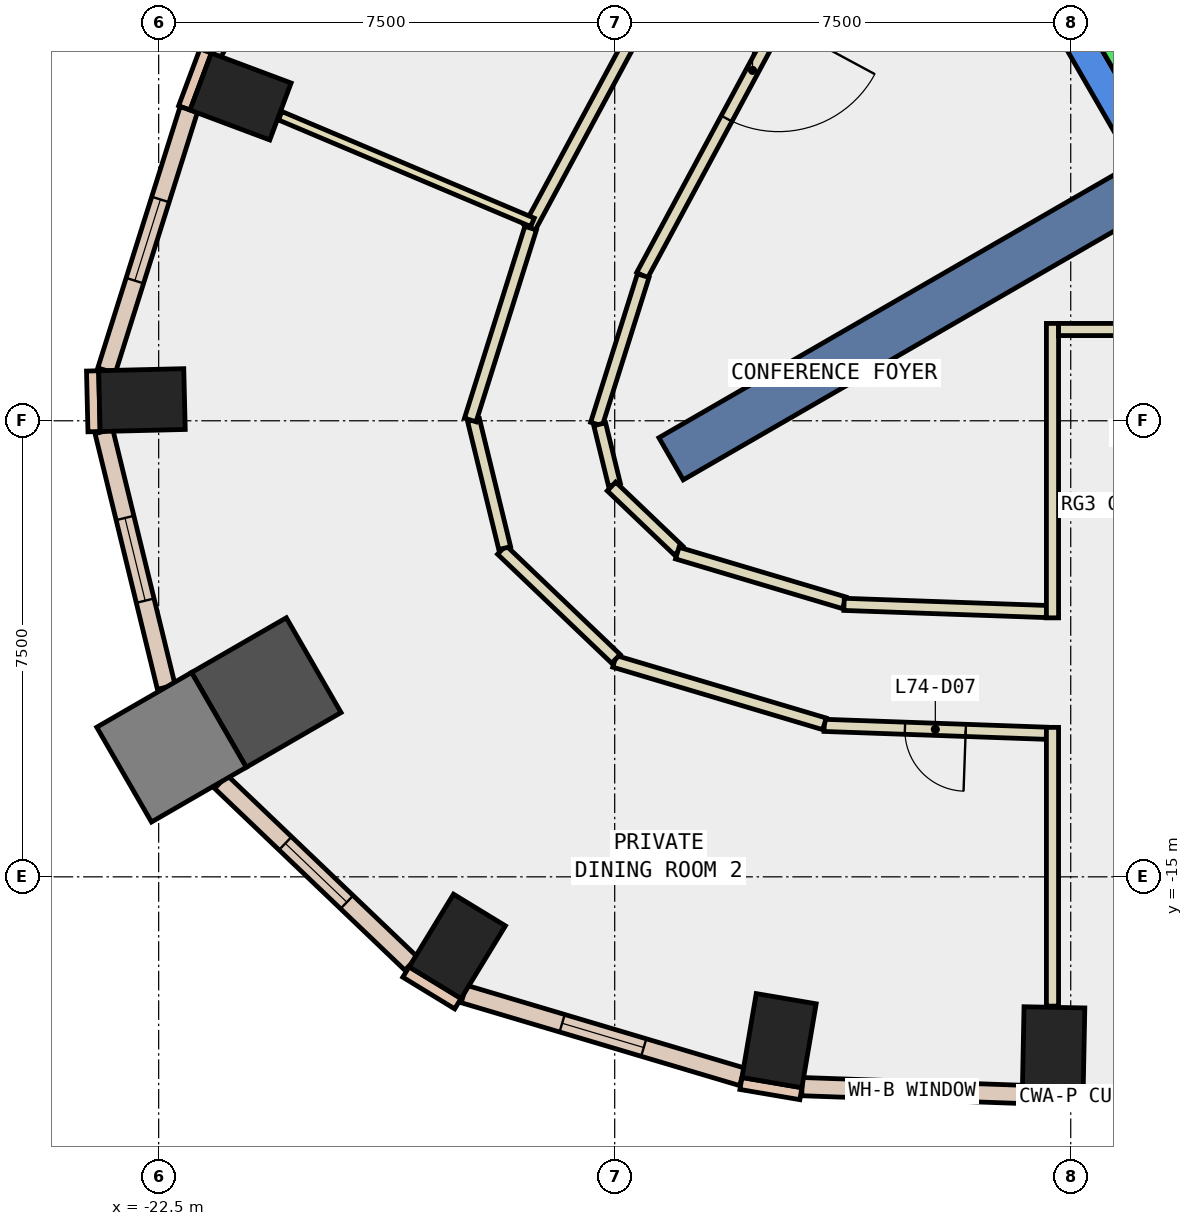
"""IFC4 building model, lengths in metres.
Left out: names, types, materials, properties, quantities, classifications, styles, units other than length and angle.
Written with IfcOpenShell. Run it as: python <this file> out.ifc"""

import sys

from ifc_helpers import new_model, si_unit, direction, frame, frame_2d, origin, origin_2d, place, context, subcontext, project, spatial, polyline, rectangle, outline, extrude, element, fill, save


model = new_model("IFC4")
c1 = context("Model", 3, precision=1e-05, world=origin(), true_north=direction((0.0, 1.0)))
c2 = subcontext(c1, "Body", "Model", "MODEL_VIEW")
j1 = project(units=[si_unit("LENGTHUNIT", "METRE"), si_unit("PLANEANGLEUNIT", "RADIAN")], contexts=[c1])
p1 = place(None, origin())
s1 = spatial("IfcSite", under=j1, at=p1, CompositionType="ELEMENT")
p2 = place(p1, origin())
s2 = spatial("IfcBuilding", under=s1, at=p2, CompositionType="ELEMENT")
p3 = place(p2, frame((0.0, 0.0, 315.2)))
s3 = spatial("IfcBuildingStorey", under=s2, at=p3, CompositionType="ELEMENT", Elevation=315.2)
for number, where, z_axis, x_axis in (
    (1, (-12.297, -17.694, -0.34), (0.0, 0.0, 1.0), (-0.986, 0.168, 0.0)),
    (2, (-7.782, -17.846, -0.34), (0.0, 0.0, 1.0), (-1.0, 0.02, 0.0)),
    (3, (-21.153, -2.168, -0.34), (0.0, 0.0, 1.0), (0.351, 0.936, 0.0)),
    (4, (-22.775, -7.16, -0.34), (0.0, 0.0, 1.0), (-0.024, 1.0, 0.0)),
):
    element("IfcColumn", number, at=place(p3, frame(where, z_axis=z_axis, x_axis=x_axis)), inside=s3, PredefinedType="COLUMN", context=c2, shape_type="SweptSolid", body=[
        extrude(rectangle(XDim=1.0, YDim=1.4, at=origin_2d()), origin(), (0.0, 0.0, 1.0), 3.6),
    ])
p4 = place(p3, frame((-20.73, -11.969, -0.34), z_axis=(0.0, 0.0, 1.0), x_axis=(0.866025403784, 0.5, 0.0)))
e5 = element("IfcColumn", 5, at=p4, inside=s3, PredefinedType="COLUMN", context=c2, shape_type="SweptSolid", body=[
    extrude(rectangle(XDim=1.8, YDim=1.8, at=origin_2d()), origin(), (0.0, 0.0, 1.0), 3.6),
])
p5 = place(p3, frame((-17.589, -16.143, -0.34), z_axis=(0.0, 0.0, 1.0), x_axis=(-0.853650808213, 0.520845752251, 0.0)))
e6 = element("IfcColumn", 6, at=p5, inside=s3, PredefinedType="COLUMN", context=c2, shape_type="SweptSolid", body=[
    extrude(rectangle(XDim=1.0, YDim=1.4, at=origin_2d()), origin(), (0.0, 0.0, 1.0), 3.6),
])
p6 = place(p3, frame((-22.289, -12.869, -0.34), z_axis=(0.0, 0.0, 1.0), x_axis=(0.866025403784, 0.5, 0.0)))
e7 = element("IfcColumn", 7, at=p6, inside=s3, PredefinedType="COLUMN", context=c2, shape_type="SweptSolid", body=[
    extrude(rectangle(XDim=1.8, YDim=1.8, at=origin_2d()), origin(), (0.0, 0.0, 1.0), 3.6),
])
p7 = place(p3, frame((0.0, 0.0, -0.34)))
e8 = element("IfcWall", 8, at=p7, inside=s3, PredefinedType="SHEAR", context=c2, shape_type="SweptSolid", body=[
    extrude(outline(polyline([(-9.815, 2.5), (-4.907, -6.0), (-4.619, -5.5), (-9.238, 2.5), (-9.815, 2.5)])), origin(), (0.0, 0.0, 1.0), 3.6),
])
p8 = place(p3, frame((-6.279, -3.625, -0.34), z_axis=(0.0, 0.0, 1.0), x_axis=(-0.866017533419, -0.500013631625, 0.0)))
e9 = element("IfcWall", 9, at=p8, inside=s3, PredefinedType="SHEAR", context=c2, shape_type="SweptSolid", body=[
    extrude(rectangle(XDim=9.0, YDim=0.8, at=frame_2d((4.5, 0.0))), origin(), (0.0, 0.0, 1.0), 3.6),
])
p9 = place(p3, frame((-21.727, -1.419, 0.0), z_axis=(0.0, 0.0, 1.0), x_axis=(-0.350962844851, -0.936389385637, 0.0)))
e10 = element("IfcWall", 10, at=p9, inside=s3, PredefinedType="STANDARD", context=c2, shape_type="SweptSolid", body=[
    extrude(rectangle(XDim=1.0, YDim=0.2, at=frame_2d((0.5, 0.0))), origin(), (0.0, 0.0, 1.0), 3.26),
])
for number, where, z_axis, x_axis in (
    (11, (-12.924, -18.398, 0.0), (0.0, 0.0, 1.0), (0.986, -0.168, 0.0)),
    (12, (-8.298, -18.636, 0.0), (0.0, 0.0, 1.0), (1.0, -0.02, 0.0)),
):
    element("IfcWall", number, at=place(p3, frame(where, z_axis=z_axis, x_axis=x_axis)), inside=s3, PredefinedType="STANDARD", context=c2, shape_type="SweptSolid", body=[
        extrude(rectangle(XDim=1.0, YDim=0.2, at=frame_2d((0.5, 0.0))), origin(), (0.0, 0.0, 1.0), 3.26),
    ])
p10 = place(p3, frame((-23.587, -6.68, 0.0), z_axis=(0.0, 0.0, 1.0), x_axis=(0.023942303888, -0.999713341956, 0.0)))
e13 = element("IfcWall", 13, at=p10, inside=s3, PredefinedType="STANDARD", context=c2, shape_type="SweptSolid", body=[
    extrude(rectangle(XDim=0.999, YDim=0.2, at=frame_2d((0.5, 0.0))), origin(), (0.0, 0.0, 1.0), 3.26),
])
p11 = place(p3, frame((-18.433, -16.565, 0.0), z_axis=(0.0, 0.0, 1.0), x_axis=(0.853679739553, -0.520798331677, 0.0)))
e14 = element("IfcWall", 14, at=p11, inside=s3, PredefinedType="STANDARD", context=c2, shape_type="SweptSolid", body=[
    extrude(rectangle(XDim=1.0, YDim=0.2, at=frame_2d((0.5, 0.0))), origin(), (0.0, 0.0, 1.0), 3.26),
])
p12 = place(p3, frame((-11.919, -18.45, 0.0), z_axis=(0.0, 0.0, 1.0), x_axis=(0.999377185233, -0.035287981473, 0.0)))
e15 = element("IfcWall", 15, at=p12, inside=s3, PredefinedType="STANDARD", context=c2, shape_type="SweptSolid", body=[
    extrude(rectangle(XDim=3.625, YDim=0.3, at=frame_2d((1.812, 0.0))), origin(), (0.0, 0.0, 1.0), 3.26),
])
p13 = place(p12, frame((1.113, 0.0, 0.9)))
e16 = element("IfcOpeningElement", 16, at=p13, cuts=e15, PredefinedType="OPENING", context=c2, shape_type="SweptSolid", body=[
    extrude(rectangle(XDim=1.4, YDim=2.0, at=frame_2d((0.7, 1.0))), frame((0.0, 0.16, 0.0), z_axis=(0.0, -1.0, 0.0), x_axis=(1.0, 0.0, 0.0)), (0.0, 0.0, 1.0), 0.32),
])
p14 = place(p3, frame((-18.097, 5.066, 0.0), z_axis=(0.0, 0.0, 1.0), x_axis=(-0.474421773145, -0.880297666228, 0.0)))
e17 = element("IfcWall", 17, at=p14, inside=s3, PredefinedType="STANDARD", context=c2, shape_type="SweptSolid", body=[
    extrude(rectangle(XDim=7.416, YDim=0.3, at=frame_2d((3.708, 0.0))), origin(), (0.0, 0.0, 1.0), 3.26),
])
p15 = place(p14, frame((0.754, 0.0, 0.9)))
e18 = element("IfcOpeningElement", 18, at=p15, cuts=e17, PredefinedType="OPENING", context=c2, shape_type="SweptSolid", body=[
    extrude(rectangle(XDim=2.2, YDim=2.0, at=frame_2d((1.1, 1.0))), frame((0.0, 0.16, 0.0), z_axis=(0.0, -1.0, 0.0), x_axis=(1.0, 0.0, 0.0)), (0.0, 0.0, 1.0), 0.32),
])
p16 = place(p14, frame((4.462, 0.0, 0.9)))
e19 = element("IfcOpeningElement", 19, at=p16, cuts=e17, PredefinedType="OPENING", context=c2, shape_type="SweptSolid", body=[
    extrude(rectangle(XDim=2.2, YDim=2.0, at=frame_2d((1.1, 1.0))), frame((0.0, 0.16, 0.0), z_axis=(0.0, -1.0, 0.0), x_axis=(1.0, 0.0, 0.0)), (0.0, 0.0, 1.0), 0.32),
])
p17 = place(p3, frame((-22.005, -2.381, 0.0), z_axis=(0.0, 0.0, 1.0), x_axis=(-0.300534385574, -0.953770980418, 0.0)))
e20 = element("IfcWall", 20, at=p17, inside=s3, PredefinedType="STANDARD", context=c2, shape_type="SweptSolid", body=[
    extrude(rectangle(XDim=4.502, YDim=0.3, at=frame_2d((2.251, 0.0))), origin(), (0.0, 0.0, 1.0), 3.26),
])
p18 = place(p17, frame((1.551, 0.0, 0.9)))
e21 = element("IfcOpeningElement", 21, at=p18, cuts=e20, PredefinedType="OPENING", context=c2, shape_type="SweptSolid", body=[
    extrude(rectangle(XDim=1.4, YDim=2.0, at=frame_2d((0.7, 1.0))), frame((0.0, 0.16, 0.0), z_axis=(0.0, -1.0, 0.0), x_axis=(1.0, 0.0, 0.0)), (0.0, 0.0, 1.0), 0.32),
])
p19 = place(p3, frame((-23.401, -7.675, 0.0), z_axis=(0.0, 0.0, 1.0), x_axis=(0.236958776561, -0.971519705519, 0.0)))
e22 = element("IfcWall", 22, at=p19, inside=s3, PredefinedType="STANDARD", context=c2, shape_type="SweptSolid", body=[
    extrude(rectangle(XDim=4.329, YDim=0.3, at=frame_2d((2.165, 0.0))), origin(), (0.0, 0.0, 1.0), 3.26),
])
p20 = place(p19, frame((1.465, 0.0, 0.9)))
e23 = element("IfcOpeningElement", 23, at=p20, cuts=e22, PredefinedType="OPENING", context=c2, shape_type="SweptSolid", body=[
    extrude(rectangle(XDim=1.4, YDim=2.0, at=frame_2d((0.7, 1.0))), frame((0.0, 0.16, 0.0), z_axis=(0.0, -1.0, 0.0), x_axis=(1.0, 0.0, 0.0)), (0.0, 0.0, 1.0), 0.32),
])
p21 = place(p3, frame((-21.476, -13.438, 0.0), z_axis=(0.0, 0.0, 1.0), x_axis=(0.723113419412, -0.690729312152, 0.0)))
e24 = element("IfcWall", 24, at=p21, inside=s3, PredefinedType="STANDARD", context=c2, shape_type="SweptSolid", body=[
    extrude(rectangle(XDim=4.327, YDim=0.3, at=frame_2d((2.164, 0.0))), origin(), (0.0, 0.0, 1.0), 3.26),
])
p22 = place(p21, frame((1.464, 0.0, 0.9)))
e25 = element("IfcOpeningElement", 25, at=p22, cuts=e24, PredefinedType="OPENING", context=c2, shape_type="SweptSolid", body=[
    extrude(rectangle(XDim=1.4, YDim=2.0, at=frame_2d((0.7, 1.0))), frame((0.0, 0.16, 0.0), z_axis=(0.0, -1.0, 0.0), x_axis=(1.0, 0.0, 0.0)), (0.0, 0.0, 1.0), 0.32),
])
p23 = place(p3, frame((-17.482, -16.926, 0.0), z_axis=(0.0, 0.0, 1.0), x_axis=(0.95841929886, -0.285363711031, 0.0)))
e26 = element("IfcWall", 26, at=p23, inside=s3, PredefinedType="STANDARD", context=c2, shape_type="SweptSolid", body=[
    extrude(rectangle(XDim=4.777, YDim=0.3, at=frame_2d((2.388, 0.0))), origin(), (0.0, 0.0, 1.0), 3.26),
])
p24 = place(p23, frame((1.688, 0.0, 0.9)))
e27 = element("IfcOpeningElement", 27, at=p24, cuts=e26, PredefinedType="OPENING", context=c2, shape_type="SweptSolid", body=[
    extrude(rectangle(XDim=1.4, YDim=2.0, at=frame_2d((0.7, 1.0))), frame((0.0, 0.16, 0.0), z_axis=(0.0, -1.0, 0.0), x_axis=(1.0, 0.0, 0.0)), (0.0, 0.0, 1.0), 0.32),
])
p25 = place(p3, frame((-10.917, 1.631, 0.0), z_axis=(0.0, 0.0, 1.0), x_axis=(-0.47449538478, -0.880257990491, 0.0)))
e28 = element("IfcWall", 28, at=p25, inside=s3, PredefinedType="PARTITIONING", context=c2, shape_type="SweptSolid", body=[
    extrude(rectangle(XDim=7.655, YDim=0.2, at=frame_2d((3.827, 0.0))), origin(), (0.0, 0.0, 1.0), 3.26),
])
p26 = place(p25, frame((2.927, 0.0, 0.0)))
e29 = element("IfcOpeningElement", 29, at=p26, cuts=e28, PredefinedType="OPENING", context=c2, shape_type="SweptSolid", body=[
    extrude(rectangle(XDim=1.8, YDim=2.1, at=frame_2d((0.9, 1.05))), frame((0.0, 0.11, 0.0), z_axis=(0.0, -1.0, 0.0), x_axis=(1.0, 0.0, 0.0)), (0.0, 0.0, 1.0), 0.22),
])
p27 = place(p3, frame((-14.531, -5.114, 0.0), z_axis=(0.0, 0.0, 1.0), x_axis=(-0.300501248013, -0.953781421471, 0.0)))
e30 = element("IfcWall", 30, at=p27, inside=s3, PredefinedType="PARTITIONING", context=c2, shape_type="SweptSolid", body=[
    extrude(rectangle(XDim=2.559, YDim=0.2, at=frame_2d((1.28, 0.0))), origin(), (0.0, 0.0, 1.0), 3.26),
])
p28 = place(p3, frame((-15.247, -7.557, 0.0), z_axis=(0.0, 0.0, 1.0), x_axis=(0.237373129266, -0.971418549083, 0.0)))
e31 = element("IfcWall", 31, at=p28, inside=s3, PredefinedType="PARTITIONING", context=c2, shape_type="SweptSolid", body=[
    extrude(rectangle(XDim=1.024, YDim=0.2, at=frame_2d((0.512, 0.0))), origin(), (0.0, 0.0, 1.0), 3.26),
])
p29 = place(p3, frame((-15.053, -8.58, 0.0), z_axis=(0.0, 0.0, 1.0), x_axis=(0.723283043556, -0.690551691696, 0.0)))
e32 = element("IfcWall", 32, at=p29, inside=s3, PredefinedType="PARTITIONING", context=c2, shape_type="SweptSolid", body=[
    extrude(rectangle(XDim=1.529, YDim=0.2, at=frame_2d((0.765, 0.0))), origin(), (0.0, 0.0, 1.0), 3.26),
])
p30 = place(p3, frame((-13.971, -9.676, 0.0), z_axis=(0.0, 0.0, 1.0), x_axis=(0.958417413979, -0.285370041492, 0.0)))
e33 = element("IfcWall", 33, at=p30, inside=s3, PredefinedType="PARTITIONING", context=c2, shape_type="SweptSolid", body=[
    extrude(rectangle(XDim=2.866, YDim=0.2, at=frame_2d((1.433, 0.0))), origin(), (0.0, 0.0, 1.0), 3.26),
])
p31 = place(p3, frame((-11.228, -10.519, 0.0), z_axis=(0.0, 0.0, 1.0), x_axis=(0.999372900517, -0.035409119054, 0.0)))
e34 = element("IfcWall", 34, at=p31, inside=s3, PredefinedType="PARTITIONING", context=c2, shape_type="SweptSolid", body=[
    extrude(rectangle(XDim=3.33, YDim=0.2, at=frame_2d((1.665, 0.0))), origin(), (0.0, 0.0, 1.0), 3.26),
])
p32 = place(p3, frame((-16.399, -4.325, 0.0), z_axis=(0.0, 0.0, 1.0), x_axis=(0.474489967676, 0.880260910512, 0.0)))
e35 = element("IfcWall", 35, at=p32, inside=s3, PredefinedType="PARTITIONING", context=c2, shape_type="SweptSolid", body=[
    extrude(rectangle(XDim=7.948, YDim=0.2, at=frame_2d((3.974, 0.0))), origin(), (0.0, 0.0, 1.0), 3.26),
])
p33 = place(p32, frame((3.474, 0.0, 0.0)))
e36 = element("IfcOpeningElement", 36, at=p33, cuts=e35, PredefinedType="OPENING", context=c2, shape_type="SweptSolid", body=[
    extrude(rectangle(XDim=1.0, YDim=2.1, at=frame_2d((0.5, 1.05))), frame((0.0, 0.11, 0.0), z_axis=(0.0, -1.0, 0.0), x_axis=(1.0, 0.0, 0.0)), (0.0, 0.0, 1.0), 0.22),
])
p34 = place(p3, frame((-7.9, -12.639, 0.0), z_axis=(0.0, 0.0, 1.0), x_axis=(-0.999368879246, 0.035522432268, 0.0)))
e37 = element("IfcWall", 37, at=p34, inside=s3, PredefinedType="PARTITIONING", context=c2, shape_type="SweptSolid", body=[
    extrude(rectangle(XDim=3.656, YDim=0.2, at=frame_2d((1.828, 0.0))), origin(), (0.0, 0.0, 1.0), 3.26),
])
p35 = place(p34, frame((1.328, 0.0, 0.0)))
e38 = element("IfcOpeningElement", 38, at=p35, cuts=e37, PredefinedType="OPENING", context=c2, shape_type="SweptSolid", body=[
    extrude(rectangle(XDim=1.0, YDim=2.1, at=frame_2d((0.5, 1.05))), frame((0.0, 0.11, 0.0), z_axis=(0.0, -1.0, 0.0), x_axis=(1.0, 0.0, 0.0)), (0.0, 0.0, 1.0), 0.22),
])
p36 = place(p3, frame((-11.55, -12.484, 0.0), z_axis=(0.0, 0.0, 1.0), x_axis=(-0.958459796003, 0.285227662485, 0.0)))
e39 = element("IfcWall", 39, at=p36, inside=s3, PredefinedType="PARTITIONING", context=c2, shape_type="SweptSolid", body=[
    extrude(rectangle(XDim=3.604, YDim=0.2, at=frame_2d((1.802, 0.0))), origin(), (0.0, 0.0, 1.0), 3.26),
])
p37 = place(p3, frame((-14.98, -11.415, 0.0), z_axis=(0.0, 0.0, 1.0), x_axis=(-0.723099256445, 0.690744138831, 0.0)))
e40 = element("IfcWall", 40, at=p37, inside=s3, PredefinedType="PARTITIONING", context=c2, shape_type="SweptSolid", body=[
    extrude(rectangle(XDim=2.596, YDim=0.2, at=frame_2d((1.298, 0.0))), origin(), (0.0, 0.0, 1.0), 3.26),
])
p38 = place(p3, frame((-16.809, -9.594, 0.0), z_axis=(0.0, 0.0, 1.0), x_axis=(-0.23664760587, 0.971595548897, 0.0)))
e41 = element("IfcWall", 41, at=p38, inside=s3, PredefinedType="PARTITIONING", context=c2, shape_type="SweptSolid", body=[
    extrude(rectangle(XDim=2.167, YDim=0.2, at=frame_2d((1.084, 0.0))), origin(), (0.0, 0.0, 1.0), 3.26),
])
p39 = place(p3, frame((-17.375, -7.487, 0.0), z_axis=(0.0, 0.0, 1.0), x_axis=(0.300195088058, 0.953877827138, 0.0)))
e42 = element("IfcWall", 42, at=p39, inside=s3, PredefinedType="PARTITIONING", context=c2, shape_type="SweptSolid", body=[
    extrude(rectangle(XDim=3.308, YDim=0.2, at=frame_2d((1.654, 0.0))), origin(), (0.0, 0.0, 1.0), 3.26),
])
p40 = place(p3, frame((-7.8, -10.741, 0.0), z_axis=(0.0, 0.0, 1.0), x_axis=(0.0, 1.0, 0.0)))
e43 = element("IfcWall", 43, at=p40, inside=s3, PredefinedType="PARTITIONING", context=c2, shape_type="SweptSolid", body=[
    extrude(rectangle(XDim=4.842, YDim=0.2, at=frame_2d((2.421, 0.0))), origin(), (0.0, 0.0, 1.0), 3.26),
])
p41 = place(p3, frame((-7.7, -5.999, 0.0), z_axis=(0.0, 0.0, 1.0), x_axis=(1.0, 0.0, 0.0)))
e44 = element("IfcWall", 44, at=p41, inside=s3, PredefinedType="PARTITIONING", context=c2, shape_type="SweptSolid", body=[
    extrude(rectangle(XDim=2.792, YDim=0.2, at=frame_2d((1.396, 0.0))), origin(), (0.0, 0.0, 1.0), 3.26),
])
p42 = place(p3, frame((-7.8, -17.126, 0.0), z_axis=(0.0, 0.0, 1.0), x_axis=(0.0, 1.0, 0.0)))
e45 = element("IfcWall", 45, at=p42, inside=s3, PredefinedType="PARTITIONING", context=c2, shape_type="SweptSolid", body=[
    extrude(rectangle(XDim=4.584, YDim=0.2, at=frame_2d((2.292, 0.0))), origin(), (0.0, 0.0, 1.0), 3.26),
])
p43 = place(p3, frame((-16.352, -4.237, 0.0), z_axis=(0.0, 0.0, 1.0), x_axis=(-0.921092849348, 0.389342988738, 0.0)))
e46 = element("IfcWall", 46, at=p43, inside=s3, PredefinedType="PARTITIONING", context=c2, shape_type="SweptSolid", body=[
    extrude(rectangle(XDim=4.505, YDim=0.15, at=frame_2d((2.253, 0.0))), origin(), (0.0, 0.0, 1.0), 3.26),
])
p44 = place(p3, frame((-8.192, 0.888, 0.0), z_axis=(0.0, 0.0, 1.0), x_axis=(0.500034260056, -0.866005622828, 0.0)))
e47 = element("IfcWall", 47, at=p44, inside=s3, PredefinedType="STANDARD", context=c2, shape_type="SweptSolid", body=[
    extrude(rectangle(XDim=5.399, YDim=0.2, at=frame_2d((2.7, 0.0))), origin(), (0.0, 0.0, 1.0), 3.26),
])
p45 = place(p3, frame((-4.677, -0.2, 0.0), z_axis=(0.0, 0.0, 1.0), x_axis=(-0.865973769406, -0.500089422704, 0.0)))
e48 = element("IfcWall", 48, at=p45, inside=s3, PredefinedType="STANDARD", context=c2, shape_type="SweptSolid", body=[
    extrude(rectangle(XDim=2.399, YDim=0.2, at=frame_2d((1.2, 0.0))), origin(), (0.0, 0.0, 1.0), 3.26),
])
p46 = place(p13, origin())
e49 = element("IfcWindow", 49, at=p46, inside=s3, PartitioningType="SINGLE_PANEL", PredefinedType="WINDOW", context=c2, shape_type="SweptSolid", body=[
    extrude(rectangle(XDim=1.4, YDim=2.0, at=frame_2d((0.7, 1.0))), frame((0.0, 0.03, 0.0), z_axis=(0.0, -1.0, 0.0), x_axis=(1.0, 0.0, 0.0)), (0.0, 0.0, 1.0), 0.06),
])
fill(e16, e49)
p47 = place(p18, origin())
e50 = element("IfcWindow", 50, at=p47, inside=s3, PartitioningType="SINGLE_PANEL", PredefinedType="WINDOW", context=c2, shape_type="SweptSolid", body=[
    extrude(rectangle(XDim=1.4, YDim=2.0, at=frame_2d((0.7, 1.0))), frame((0.0, 0.03, 0.0), z_axis=(0.0, -1.0, 0.0), x_axis=(1.0, 0.0, 0.0)), (0.0, 0.0, 1.0), 0.06),
])
fill(e21, e50)
p48 = place(p20, origin())
e51 = element("IfcWindow", 51, at=p48, inside=s3, PartitioningType="SINGLE_PANEL", PredefinedType="WINDOW", context=c2, shape_type="SweptSolid", body=[
    extrude(rectangle(XDim=1.4, YDim=2.0, at=frame_2d((0.7, 1.0))), frame((0.0, 0.03, 0.0), z_axis=(0.0, -1.0, 0.0), x_axis=(1.0, 0.0, 0.0)), (0.0, 0.0, 1.0), 0.06),
])
fill(e23, e51)
p49 = place(p22, origin())
e52 = element("IfcWindow", 52, at=p49, inside=s3, PartitioningType="SINGLE_PANEL", PredefinedType="WINDOW", context=c2, shape_type="SweptSolid", body=[
    extrude(rectangle(XDim=1.4, YDim=2.0, at=frame_2d((0.7, 1.0))), frame((0.0, 0.03, 0.0), z_axis=(0.0, -1.0, 0.0), x_axis=(1.0, 0.0, 0.0)), (0.0, 0.0, 1.0), 0.06),
])
fill(e25, e52)
p50 = place(p24, origin())
e53 = element("IfcWindow", 53, at=p50, inside=s3, PartitioningType="SINGLE_PANEL", PredefinedType="WINDOW", context=c2, shape_type="SweptSolid", body=[
    extrude(rectangle(XDim=1.4, YDim=2.0, at=frame_2d((0.7, 1.0))), frame((0.0, 0.03, 0.0), z_axis=(0.0, -1.0, 0.0), x_axis=(1.0, 0.0, 0.0)), (0.0, 0.0, 1.0), 0.06),
])
fill(e27, e53)
p51 = place(p35, origin())
e54 = element("IfcDoor", 54, at=p51, inside=s3, OperationType="SINGLE_SWING_LEFT", PredefinedType="DOOR", context=c2, shape_type="SweptSolid", body=[
    extrude(rectangle(XDim=1.0, YDim=2.1, at=frame_2d((0.5, 1.05))), frame((0.0, 0.025, 0.0), z_axis=(0.0, -1.0, 0.0), x_axis=(1.0, 0.0, 0.0)), (0.0, 0.0, 1.0), 0.05),
])
fill(e38, e54)
p52 = place(p26, origin())
e55 = element("IfcDoor", 55, at=p52, inside=s3, OperationType="DOUBLE_DOOR_SINGLE_SWING", PredefinedType="DOOR", context=c2, shape_type="SweptSolid", body=[
    extrude(rectangle(XDim=1.8, YDim=2.1, at=frame_2d((0.9, 1.05))), frame((0.0, 0.025, 0.0), z_axis=(0.0, -1.0, 0.0), x_axis=(1.0, 0.0, 0.0)), (0.0, 0.0, 1.0), 0.05),
])
fill(e29, e55)
save(model, sys.argv[1])
